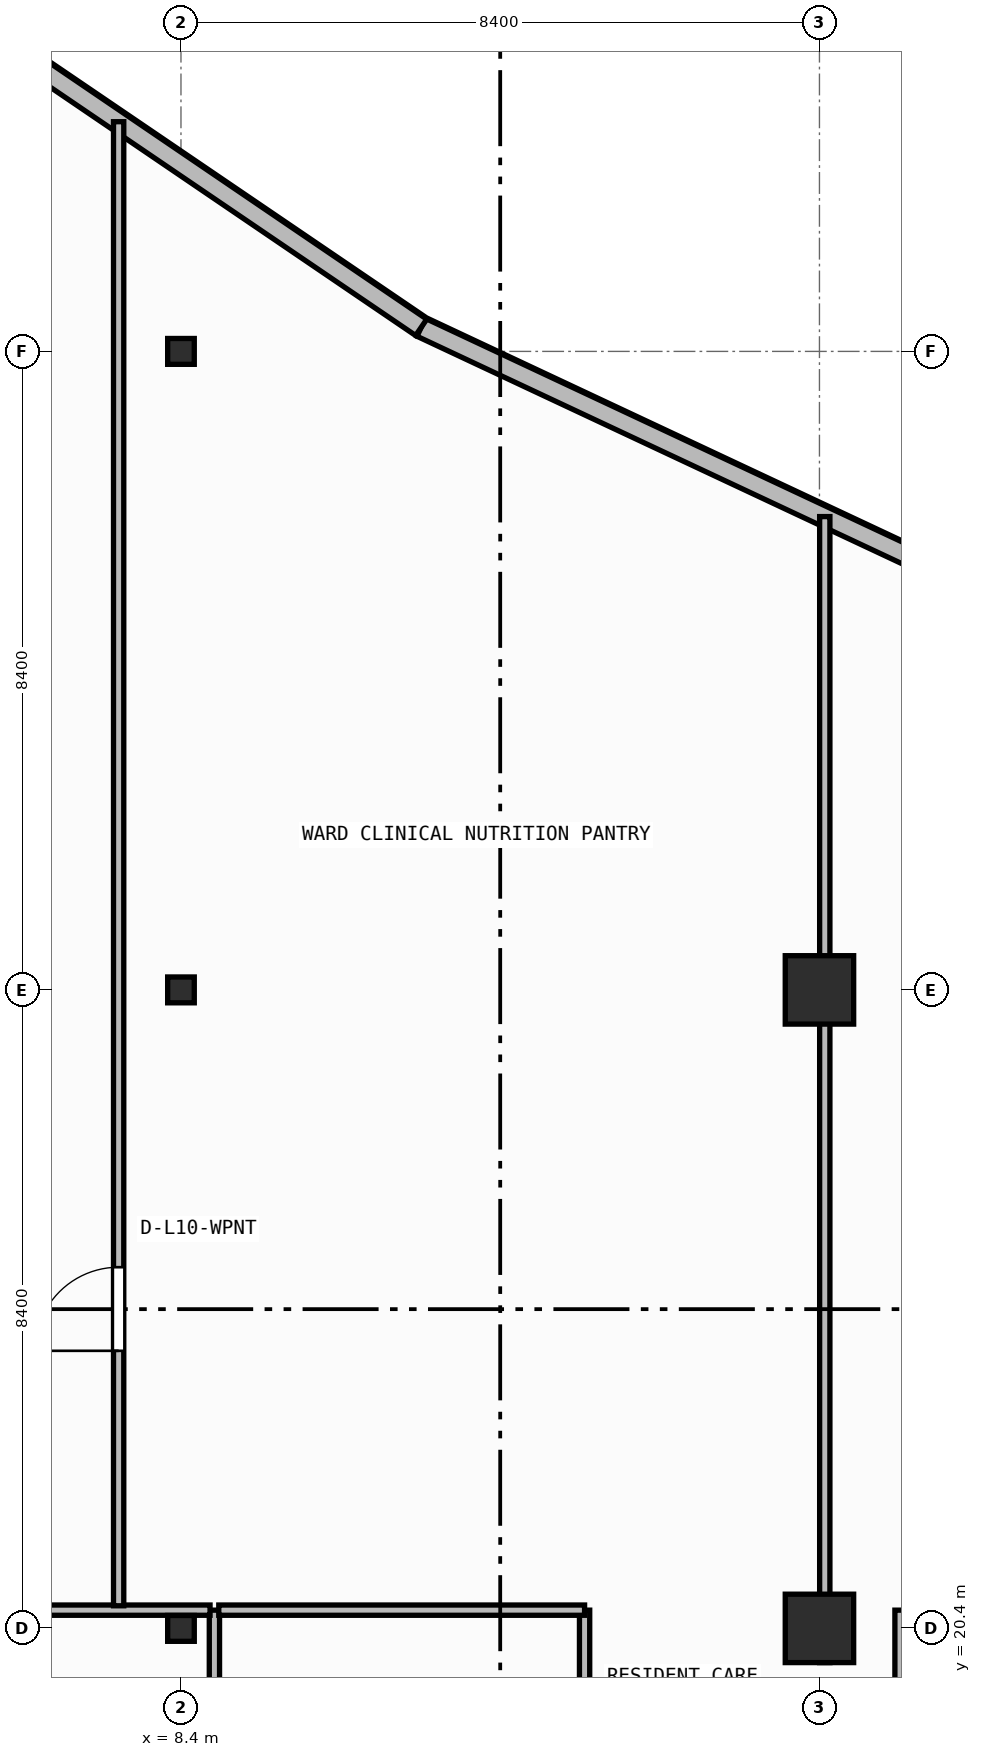
"""IFC4 building model, lengths in metres.
Left out: names, types, materials, properties, quantities, classifications, styles, units other than length and angle.
Written with IfcOpenShell. Run it as: python <this file> out.ifc"""

import sys

from ifc_helpers import new_model, si_unit, direction, frame, frame_2d, origin, origin_2d, place, context, subcontext, project, spatial, rectangle, i_section, extrude, element, fill, save


model = new_model("IFC4")
c1 = context("Model", 3, precision=1e-05, world=origin(), true_north=direction((0.0, 1.0)))
c2 = subcontext(c1, "Body", "Model", "MODEL_VIEW")
j1 = project(units=[si_unit("LENGTHUNIT", "METRE"), si_unit("PLANEANGLEUNIT", "RADIAN")], contexts=[c1])
p1 = place(None, origin())
s1 = spatial("IfcSite", under=j1, at=p1, CompositionType="ELEMENT")
p2 = place(p1, origin())
s2 = spatial("IfcBuilding", under=s1, at=p2, CompositionType="ELEMENT")
p3 = place(p2, frame((0.0, 0.0, 42.25)))
s3 = spatial("IfcBuildingStorey", under=s2, at=p3, CompositionType="ELEMENT", Elevation=42.25)
p4 = place(p3, frame((8.4, 20.4, 0.0), z_axis=(0.0, 0.0, 1.0), x_axis=(1.0, 0.0, 0.0)))
e1 = element("IfcColumn", 1, at=p4, inside=s3, PredefinedType="COLUMN", context=c2, shape_type="SweptSolid", body=[
    extrude(i_section(OverallWidth=0.35, OverallDepth=0.34, WebThickness=0.016, FlangeThickness=0.028, at=origin_2d()), origin(), (0.0, 0.0, 1.0), 3.95),
])
p5 = place(p3, frame((16.8, 20.4, 0.0), z_axis=(0.0, 0.0, 1.0), x_axis=(1.0, 0.0, 0.0)))
e2 = element("IfcColumn", 2, at=p5, inside=s3, PredefinedType="COLUMN", context=c2, shape_type="SweptSolid", body=[
    extrude(rectangle(XDim=0.9, YDim=0.9, at=origin_2d()), origin(), (0.0, 0.0, 1.0), 3.95),
])
p6 = place(p3, frame((8.4, 28.8, 0.0), z_axis=(0.0, 0.0, 1.0), x_axis=(1.0, 0.0, 0.0)))
e3 = element("IfcColumn", 3, at=p6, inside=s3, PredefinedType="COLUMN", context=c2, shape_type="SweptSolid", body=[
    extrude(i_section(OverallWidth=0.35, OverallDepth=0.34, WebThickness=0.016, FlangeThickness=0.028, at=origin_2d()), origin(), (0.0, 0.0, 1.0), 3.95),
])
p7 = place(p3, frame((16.8, 28.8, 0.0), z_axis=(0.0, 0.0, 1.0), x_axis=(1.0, 0.0, 0.0)))
e4 = element("IfcColumn", 4, at=p7, inside=s3, PredefinedType="COLUMN", context=c2, shape_type="SweptSolid", body=[
    extrude(rectangle(XDim=0.9, YDim=0.9, at=origin_2d()), origin(), (0.0, 0.0, 1.0), 3.95),
])
p8 = place(p3, frame((8.4, 37.2, 0.0), z_axis=(0.0, 0.0, 1.0), x_axis=(1.0, 0.0, 0.0)))
e5 = element("IfcColumn", 5, at=p8, inside=s3, PredefinedType="COLUMN", context=c2, shape_type="SweptSolid", body=[
    extrude(i_section(OverallWidth=0.35, OverallDepth=0.34, WebThickness=0.016, FlangeThickness=0.028, at=origin_2d()), origin(), (0.0, 0.0, 1.0), 3.95),
])
p9 = place(p3, frame((24.408, 31.492, 0.0), z_axis=(0.0, 0.0, 1.0), x_axis=(-0.905396522918, 0.424566998585, 0.0)))
e6 = element("IfcWall", 6, at=p9, inside=s3, PredefinedType="STANDARD", context=c2, shape_type="SweptSolid", body=[
    extrude(rectangle(XDim=14.189, YDim=0.26, at=frame_2d((7.095, 0.0))), origin(), (0.0, 0.0, 1.0), 3.71),
])
p10 = place(p9, frame((2.953, 0.0, 0.9)))
e7 = element("IfcOpeningElement", 7, at=p10, cuts=e6, PredefinedType="OPENING", context=c2, shape_type="SweptSolid", body=[
    extrude(rectangle(XDim=2.4, YDim=1.65, at=frame_2d((1.2, 0.825))), frame((0.0, 0.14, 0.0), z_axis=(0.0, -1.0, 0.0), x_axis=(1.0, 0.0, 0.0)), (0.0, 0.0, 1.0), 0.28),
])
p11 = place(p3, frame((11.561, 37.517, 0.0), z_axis=(0.0, 0.0, 1.0), x_axis=(-0.827064743936, 0.562106670782, 0.0)))
e8 = element("IfcWall", 8, at=p11, inside=s3, PredefinedType="STANDARD", context=c2, shape_type="SweptSolid", body=[
    extrude(rectangle(XDim=10.641, YDim=0.26, at=frame_2d((5.32, 0.0))), origin(), (0.0, 0.0, 1.0), 3.71),
])
p12 = place(p11, frame((6.537, 0.0, 0.9)))
e9 = element("IfcOpeningElement", 9, at=p12, cuts=e8, PredefinedType="OPENING", context=c2, shape_type="SweptSolid", body=[
    extrude(rectangle(XDim=2.4, YDim=1.65, at=frame_2d((1.2, 0.825))), frame((0.0, 0.14, 0.0), z_axis=(0.0, -1.0, 0.0), x_axis=(1.0, 0.0, 0.0)), (0.0, 0.0, 1.0), 0.28),
])
p13 = place(p3, frame((8.84, 17.833, 0.0), z_axis=(0.0, 0.0, 1.0), x_axis=(0.0, 1.0, 0.0)))
e10 = element("IfcWall", 10, at=p13, inside=s3, PredefinedType="PARTITIONING", context=c2, shape_type="SweptSolid", body=[
    extrude(rectangle(XDim=2.807, YDim=0.135, at=frame_2d((1.404, 0.0))), origin(), (0.0, 0.0, 1.0), 3.71),
])
p14 = place(p3, frame((8.782, 20.64, 0.0), z_axis=(0.0, 0.0, 1.0), x_axis=(-1.0, 0.0, 0.0)))
e11 = element("IfcWall", 11, at=p14, inside=s3, PredefinedType="PARTITIONING", context=c2, shape_type="SweptSolid", body=[
    extrude(rectangle(XDim=4.395, YDim=0.135, at=frame_2d((2.198, 0.0))), origin(), (0.0, 0.0, 1.0), 3.073),
])
p15 = place(p14, frame((3.023, 0.0, 0.0)))
e12 = element("IfcOpeningElement", 12, at=p15, cuts=e11, PredefinedType="OPENING", context=c2, shape_type="SweptSolid", body=[
    extrude(rectangle(XDim=1.1, YDim=2.1, at=frame_2d((0.55, 1.05))), frame((0.0, 0.077, 0.0), z_axis=(0.0, -1.0, 0.0), x_axis=(1.0, 0.0, 0.0)), (0.0, 0.0, 1.0), 0.155),
])
p16 = place(p3, frame((13.71, 17.833, 0.0), z_axis=(0.0, 0.0, 1.0), x_axis=(0.0, 1.0, 0.0)))
e13 = element("IfcWall", 13, at=p16, inside=s3, PredefinedType="PARTITIONING", context=c2, shape_type="SweptSolid", body=[
    extrude(rectangle(XDim=2.807, YDim=0.135, at=frame_2d((1.404, 0.0))), origin(), (0.0, 0.0, 1.0), 3.71),
])
p17 = place(p3, frame((13.71, 20.64, 0.0), z_axis=(0.0, 0.0, 1.0), x_axis=(-1.0, 0.0, 0.0)))
e14 = element("IfcWall", 14, at=p17, inside=s3, PredefinedType="PARTITIONING", context=c2, shape_type="SweptSolid", body=[
    extrude(rectangle(XDim=4.812, YDim=0.135, at=frame_2d((2.406, 0.0))), origin(), (0.0, 0.0, 1.0), 3.073),
])
p18 = place(p3, frame((17.86, 17.833, 0.0), z_axis=(0.0, 0.0, 1.0), x_axis=(0.0, 1.0, 0.0)))
e15 = element("IfcWall", 15, at=p18, inside=s3, PredefinedType="PARTITIONING", context=c2, shape_type="SweptSolid", body=[
    extrude(rectangle(XDim=2.807, YDim=0.135, at=frame_2d((1.404, 0.0))), origin(), (0.0, 0.0, 1.0), 3.71),
])
p19 = place(p3, frame((7.58, 20.698, 0.0), z_axis=(0.0, 0.0, 1.0), x_axis=(0.0, 1.0, 0.0)))
e16 = element("IfcWall", 16, at=p19, inside=s3, PredefinedType="PARTITIONING", context=c2, shape_type="SweptSolid", body=[
    extrude(rectangle(XDim=19.524, YDim=0.135, at=frame_2d((9.762, 0.0))), origin(), (0.0, 0.0, 1.0), 3.71),
])
p20 = place(p19, frame((3.354, 0.0, 0.0)))
e17 = element("IfcOpeningElement", 17, at=p20, cuts=e16, PredefinedType="OPENING", context=c2, shape_type="SweptSolid", body=[
    extrude(rectangle(XDim=1.1, YDim=2.1, at=frame_2d((0.55, 1.05))), frame((0.0, 0.077, 0.0), z_axis=(0.0, -1.0, 0.0), x_axis=(1.0, 0.0, 0.0)), (0.0, 0.0, 1.0), 0.155),
])
p21 = place(p3, frame((16.87, 19.95, 0.0), z_axis=(0.0, 0.0, 1.0), x_axis=(0.0, 1.0, 0.0)))
e18 = element("IfcWall", 18, at=p21, inside=s3, PredefinedType="PARTITIONING", context=c2, shape_type="SweptSolid", body=[
    extrude(rectangle(XDim=15.077, YDim=0.135, at=frame_2d((7.539, 0.0))), origin(), (0.0, 0.0, 1.0), 3.073),
])
p22 = place(p20, origin())
e19 = element("IfcDoor", 19, at=p22, inside=s3, OperationType="SINGLE_SWING_LEFT", PredefinedType="DOOR", context=c2, shape_type="SweptSolid", body=[
    extrude(rectangle(XDim=1.1, YDim=2.1, at=frame_2d((0.55, 1.05))), frame((0.0, 0.025, 0.0), z_axis=(0.0, -1.0, 0.0), x_axis=(1.0, 0.0, 0.0)), (0.0, 0.0, 1.0), 0.05),
])
fill(e17, e19)
save(model, sys.argv[1])
